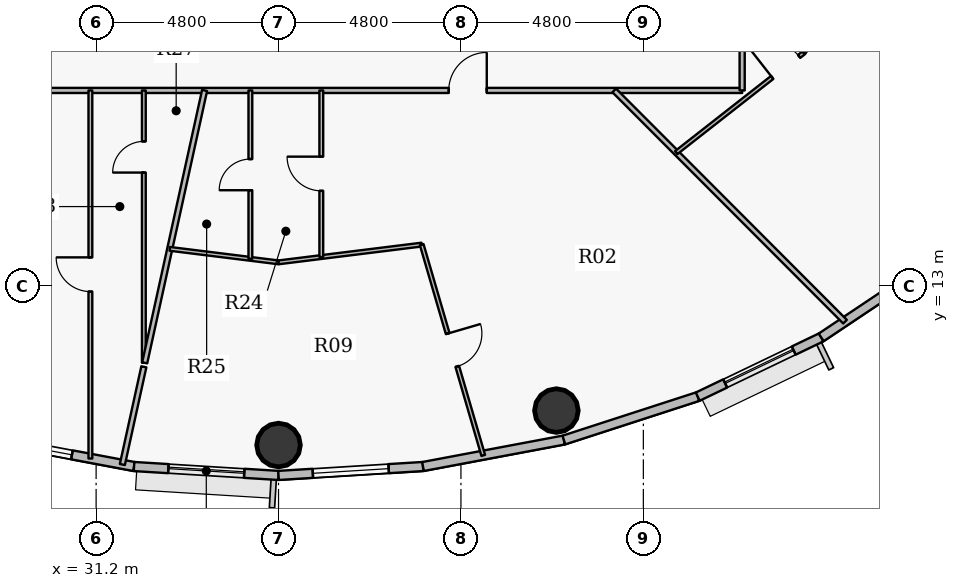
"""IFC4 building model, lengths in metres.
Left out: names, types, materials, properties, quantities, classifications, styles, units other than length and angle.
Written with IfcOpenShell. Run it as: python <this file> out.ifc"""

import sys

from ifc_helpers import new_model, si_unit, direction, frame, frame_2d, origin, origin_2d, place, context, subcontext, project, spatial, rectangle, hollow_circle, extrude, source, transform, mapped, element, fill, save


model = new_model("IFC4")
c1 = context("Model", 3, precision=1e-05, world=origin(), true_north=direction((0.0, 1.0)))
c2 = subcontext(c1, "Body", "Model", "MODEL_VIEW")
j1 = project(units=[si_unit("LENGTHUNIT", "METRE"), si_unit("PLANEANGLEUNIT", "RADIAN")], contexts=[c1])
p1 = place(None, origin())
s1 = spatial("IfcSite", under=j1, at=p1, CompositionType="ELEMENT")
p2 = place(p1, origin())
s2 = spatial("IfcBuilding", under=s1, at=p2, CompositionType="ELEMENT")
p3 = place(p2, frame((0.0, 0.0, 221.55)))
s3 = spatial("IfcBuildingStorey", under=s2, at=p3, CompositionType="ELEMENT", Elevation=221.55)
for number, where, z_axis, x_axis in (
    (1, (36.0, 8.82, 0.0), (0.0, 0.0, 1.0), (1.0, 0.0, 0.0)),
    (2, (43.312, 9.727, 0.0), (0.0, 0.0, 1.0), (1.0, 0.0, 0.0)),
):
    element("IfcColumn", number, at=place(p3, frame(where, z_axis=z_axis, x_axis=x_axis)), inside=s3, PredefinedType="COLUMN", context=c2, shape_type="SweptSolid", body=[
        extrude(hollow_circle(Radius=0.575, WallThickness=0.036, at=origin_2d()), origin(), (0.0, 0.0, 1.0), 3.75),
    ])
p4 = place(p3, frame((32.198, 8.254, 0.0), z_axis=(0.0, 0.0, 1.0), x_axis=(-0.982784898575, 0.184753465822, 0.0)))
e3 = element("IfcWall", 3, at=p4, inside=s3, PredefinedType="SOLIDWALL", context=c2, shape_type="SweptSolid", body=[
    extrude(rectangle(XDim=3.773, YDim=0.24, at=frame_2d((1.886, 0.0))), origin(), (0.0, 0.0, 1.0), 3.5),
])
p5 = place(p4, frame((1.664, 0.0, 0.9)))
e4 = element("IfcOpeningElement", 4, at=p5, cuts=e3, PredefinedType="OPENING", context=c2, shape_type="SweptSolid", body=[
    extrude(rectangle(XDim=1.25, YDim=1.65, at=origin_2d()), frame((0.625, 0.13, 0.825), z_axis=(0.0, -1.0, 0.0), x_axis=(1.0, 0.0, 0.0)), (0.0, 0.0, 1.0), 0.26),
])
p6 = place(p3, frame((36.0, 8.02, 0.0), z_axis=(0.0, 0.0, 1.0), x_axis=(-0.998108785312, 0.06147237333, 0.0)))
e5 = element("IfcWall", 5, at=p6, inside=s3, PredefinedType="SOLIDWALL", context=c2, shape_type="SweptSolid", body=[
    extrude(rectangle(XDim=3.809, YDim=0.24, at=frame_2d((1.904, 0.0))), origin(), (0.0, 0.0, 1.0), 3.5),
])
p7 = place(p6, frame((0.904, 0.0, 0.9)))
e6 = element("IfcOpeningElement", 6, at=p7, cuts=e5, PredefinedType="OPENING", context=c2, shape_type="SweptSolid", body=[
    extrude(rectangle(XDim=2.0, YDim=1.75, at=origin_2d()), frame((1.0, 0.13, 0.875), z_axis=(0.0, -1.0, 0.0), x_axis=(1.0, 0.0, 0.0)), (0.0, 0.0, 1.0), 0.26),
])
p8 = place(p3, frame((39.802, 8.254, 0.0), z_axis=(0.0, 0.0, 1.0), x_axis=(-0.998108785312, -0.06147237333, 0.0)))
e7 = element("IfcWall", 7, at=p8, inside=s3, PredefinedType="SOLIDWALL", context=c2, shape_type="SweptSolid", body=[
    extrude(rectangle(XDim=3.809, YDim=0.24, at=frame_2d((1.904, 0.0))), origin(), (0.0, 0.0, 1.0), 3.5),
])
p9 = place(p8, frame((0.905, 0.0, 0.9)))
e8 = element("IfcOpeningElement", 8, at=p9, cuts=e7, PredefinedType="OPENING", context=c2, shape_type="SweptSolid", body=[
    extrude(rectangle(XDim=2.0, YDim=1.75, at=origin_2d()), frame((1.0, 0.13, 0.875), z_axis=(0.0, -1.0, 0.0), x_axis=(1.0, 0.0, 0.0)), (0.0, 0.0, 1.0), 0.26),
])
p10 = place(p3, frame((43.509, 8.951, 0.0), z_axis=(0.0, 0.0, 1.0), x_axis=(-0.982784898575, -0.184753465822, 0.0)))
e9 = element("IfcWall", 9, at=p10, inside=s3, PredefinedType="SOLIDWALL", context=c2, shape_type="SweptSolid", body=[
    extrude(rectangle(XDim=3.773, YDim=0.24, at=frame_2d((1.886, 0.0))), origin(), (0.0, 0.0, 1.0), 3.5),
])
p11 = place(p3, frame((47.031, 10.094, 0.0), z_axis=(0.0, 0.0, 1.0), x_axis=(-0.951210789182, -0.308541787354, 0.0)))
e10 = element("IfcWall", 10, at=p11, inside=s3, PredefinedType="SOLIDWALL", context=c2, shape_type="SweptSolid", body=[
    extrude(rectangle(XDim=3.702, YDim=0.24, at=frame_2d((1.851, 0.0))), origin(), (0.0, 0.0, 1.0), 3.5),
])
p12 = place(p3, frame((50.28, 11.652, 0.0), z_axis=(0.0, 0.0, 1.0), x_axis=(-0.901598104751, -0.432574684313, 0.0)))
e11 = element("IfcWall", 11, at=p12, inside=s3, PredefinedType="SOLIDWALL", context=c2, shape_type="SweptSolid", body=[
    extrude(rectangle(XDim=3.604, YDim=0.24, at=frame_2d((1.802, 0.0))), origin(), (0.0, 0.0, 1.0), 3.5),
])
p13 = place(p12, frame((0.802, 0.0, 0.9)))
e12 = element("IfcOpeningElement", 12, at=p13, cuts=e11, PredefinedType="OPENING", context=c2, shape_type="SweptSolid", body=[
    extrude(rectangle(XDim=2.0, YDim=1.75, at=origin_2d()), frame((1.0, 0.13, 0.875), z_axis=(0.0, -1.0, 0.0), x_axis=(1.0, 0.0, 0.0)), (0.0, 0.0, 1.0), 0.26),
])
p14 = place(p3, frame((53.176, 13.589, 0.0), z_axis=(0.0, 0.0, 1.0), x_axis=(-0.831262496074, -0.555880079352, 0.0)))
e13 = element("IfcWall", 13, at=p14, inside=s3, PredefinedType="SOLIDWALL", context=c2, shape_type="SweptSolid", body=[
    extrude(rectangle(XDim=3.484, YDim=0.24, at=frame_2d((1.742, 0.0))), origin(), (0.0, 0.0, 1.0), 3.5),
])
p15 = place(p3, frame((24.35, 18.15, 0.0), z_axis=(0.0, 0.0, 1.0), x_axis=(1.0, 0.0, 0.0)))
e14 = element("IfcWall", 14, at=p15, inside=s3, PredefinedType="PARTITIONING", context=c2, shape_type="SweptSolid", body=[
    extrude(rectangle(XDim=23.85, YDim=0.135, at=frame_2d((11.925, 0.0))), origin(), (0.0, 0.0, 1.0), 2.935),
])
p16 = place(p15, frame((2.87, 0.0, 0.0)))
e15 = element("IfcOpeningElement", 15, at=p16, cuts=e14, PredefinedType="OPENING", context=c2, shape_type="SweptSolid", body=[
    extrude(rectangle(XDim=1.0, YDim=2.15, at=origin_2d()), frame((0.5, 0.078, 1.075), z_axis=(0.0, -1.0, 0.0), x_axis=(1.0, 0.0, 0.0)), (0.0, 0.0, 1.0), 0.155),
])
p17 = place(p15, frame((16.13, 0.0, 0.0)))
e16 = element("IfcOpeningElement", 16, at=p17, cuts=e14, PredefinedType="OPENING", context=c2, shape_type="SweptSolid", body=[
    extrude(rectangle(XDim=1.0, YDim=2.15, at=origin_2d()), frame((0.5, 0.078, 1.075), z_axis=(0.0, -1.0, 0.0), x_axis=(1.0, 0.0, 0.0)), (0.0, 0.0, 1.0), 0.155),
])
p18 = place(p3, frame((31.049, 8.465, 0.0), z_axis=(0.0, 0.0, 1.0), x_axis=(0.0, 1.0, 0.0)))
e17 = element("IfcWall", 17, at=p18, inside=s3, PredefinedType="PARTITIONING", context=c2, shape_type="SweptSolid", body=[
    extrude(rectangle(XDim=9.685, YDim=0.1, at=frame_2d((4.842, 0.0))), origin(), (0.0, 0.0, 1.0), 2.985),
])
p19 = place(p18, frame((4.392, 0.0, 0.0)))
e18 = element("IfcOpeningElement", 18, at=p19, cuts=e17, PredefinedType="OPENING", context=c2, shape_type="SweptSolid", body=[
    extrude(rectangle(XDim=0.9, YDim=2.1, at=origin_2d()), frame((0.45, 0.06, 1.05), z_axis=(0.0, -1.0, 0.0), x_axis=(1.0, 0.0, 0.0)), (0.0, 0.0, 1.0), 0.12),
])
p20 = place(p3, frame((31.891, 8.307, 0.0), z_axis=(0.0, 0.0, 1.0), x_axis=(0.214700779338, 0.976679873526, 0.0)))
e19 = element("IfcWall", 19, at=p20, inside=s3, PredefinedType="PARTITIONING", context=c2, shape_type="SweptSolid", body=[
    extrude(rectangle(XDim=2.632, YDim=0.135, at=frame_2d((1.316, 0.0))), origin(), (0.0, 0.0, 1.0), 2.985),
])
p21 = place(p3, frame((32.456, 10.985, 0.0), z_axis=(0.0, 0.0, 1.0), x_axis=(0.0, 1.0, 0.0)))
e20 = element("IfcWall", 20, at=p21, inside=s3, PredefinedType="PARTITIONING", context=c2, shape_type="SweptSolid", body=[
    extrude(rectangle(XDim=7.165, YDim=0.1, at=frame_2d((3.582, 0.0))), origin(), (0.0, 0.0, 1.0), 3.5),
])
p22 = place(p21, frame((5.004, 0.0, 0.0)))
e21 = element("IfcOpeningElement", 21, at=p22, cuts=e20, PredefinedType="OPENING", context=c2, shape_type="SweptSolid", body=[
    extrude(rectangle(XDim=0.82, YDim=2.1, at=origin_2d()), frame((0.41, 0.06, 1.05), z_axis=(0.0, -1.0, 0.0), x_axis=(1.0, 0.0, 0.0)), (0.0, 0.0, 1.0), 0.12),
])
p23 = place(p3, frame((32.479, 10.983, 0.0), z_axis=(0.0, 0.0, 1.0), x_axis=(0.214685976808, 0.976683127407, 0.0)))
e22 = element("IfcWall", 22, at=p23, inside=s3, PredefinedType="PARTITIONING", context=c2, shape_type="SweptSolid", body=[
    extrude(rectangle(XDim=7.338, YDim=0.135, at=frame_2d((3.669, 0.0))), origin(), (0.0, 0.0, 1.0), 3.5),
])
p24 = place(p3, frame((33.138, 13.981, 0.0), z_axis=(0.0, 0.0, 1.0), x_axis=(0.99239465631, -0.123096897311, 0.0)))
e23 = element("IfcWall", 23, at=p24, inside=s3, PredefinedType="PARTITIONING", context=c2, shape_type="SweptSolid", body=[
    extrude(rectangle(XDim=2.884, YDim=0.1, at=frame_2d((1.442, 0.0))), origin(), (0.0, 0.0, 1.0), 2.935),
])
p25 = place(p3, frame((35.259, 13.718, 0.0), z_axis=(0.0, 0.0, 1.0), x_axis=(0.0, 1.0, 0.0)))
e24 = element("IfcWall", 24, at=p25, inside=s3, PredefinedType="PARTITIONING", context=c2, shape_type="SweptSolid", body=[
    extrude(rectangle(XDim=4.432, YDim=0.1, at=frame_2d((2.216, 0.0))), origin(), (0.0, 0.0, 1.0), 3.5),
])
p26 = place(p25, frame((1.806, 0.0, 0.0)))
e25 = element("IfcOpeningElement", 25, at=p26, cuts=e24, PredefinedType="OPENING", context=c2, shape_type="SweptSolid", body=[
    extrude(rectangle(XDim=0.82, YDim=2.1, at=origin_2d()), frame((0.41, 0.06, 1.05), z_axis=(0.0, -1.0, 0.0), x_axis=(1.0, 0.0, 0.0)), (0.0, 0.0, 1.0), 0.12),
])
p27 = place(p3, frame((36.0, 13.626, 0.0), z_axis=(0.0, 0.0, 1.0), x_axis=(0.992397118202, 0.123077048159, 0.0)))
e26 = element("IfcWall", 26, at=p27, inside=s3, PredefinedType="PARTITIONING", context=c2, shape_type="SweptSolid", body=[
    extrude(rectangle(XDim=3.797, YDim=0.1, at=frame_2d((1.898, 0.0))), origin(), (0.0, 0.0, 1.0), 2.935),
])
p28 = place(p3, frame((37.126, 13.766, 0.0), z_axis=(0.0, 0.0, 1.0), x_axis=(0.0, 1.0, 0.0)))
e27 = element("IfcWall", 27, at=p28, inside=s3, PredefinedType="PARTITIONING", context=c2, shape_type="SweptSolid", body=[
    extrude(rectangle(XDim=4.384, YDim=0.1, at=frame_2d((2.192, 0.0))), origin(), (0.0, 0.0, 1.0), 3.085),
])
p29 = place(p28, frame((1.742, 0.0, 0.0)))
e28 = element("IfcOpeningElement", 28, at=p29, cuts=e27, PredefinedType="OPENING", context=c2, shape_type="SweptSolid", body=[
    extrude(rectangle(XDim=0.9, YDim=2.1, at=origin_2d()), frame((0.45, 0.06, 1.05), z_axis=(0.0, -1.0, 0.0), x_axis=(1.0, 0.0, 0.0)), (0.0, 0.0, 1.0), 0.12),
])
p30 = place(p3, frame((39.768, 14.094, 0.0), z_axis=(0.0, 0.0, 1.0), x_axis=(0.280219030024, -0.959936089129, 0.0)))
e29 = element("IfcWall", 29, at=p30, inside=s3, PredefinedType="PARTITIONING", context=c2, shape_type="SweptSolid", body=[
    extrude(rectangle(XDim=5.778, YDim=0.1, at=frame_2d((2.889, 0.0))), origin(), (0.0, 0.0, 1.0), 2.985),
])
p31 = place(p30, frame((2.439, 0.0, 0.0)))
e30 = element("IfcOpeningElement", 30, at=p31, cuts=e29, PredefinedType="OPENING", context=c2, shape_type="SweptSolid", body=[
    extrude(rectangle(XDim=0.9, YDim=2.1, at=origin_2d()), frame((0.45, 0.06, 1.05), z_axis=(0.0, -1.0, 0.0), x_axis=(1.0, 0.0, 0.0)), (0.0, 0.0, 1.0), 0.12),
])
p32 = place(p3, frame((44.833, 18.15, 0.0), z_axis=(0.0, 0.0, 1.0), x_axis=(0.706467502326, -0.707745482612, 0.0)))
e31 = element("IfcWall", 31, at=p32, inside=s3, PredefinedType="PARTITIONING", context=c2, shape_type="SweptSolid", body=[
    extrude(rectangle(XDim=8.597, YDim=0.135, at=frame_2d((4.298, 0.0))), origin(), (0.0, 0.0, 1.0), 2.985),
])
p33 = place(p3, frame((46.466, 16.515, 0.0), z_axis=(0.0, 0.0, 1.0), x_axis=(0.787371868093, 0.616478338092, 0.0)))
e32 = element("IfcWall", 32, at=p33, inside=s3, PredefinedType="PARTITIONING", context=c2, shape_type="SweptSolid", body=[
    extrude(rectangle(XDim=4.257, YDim=0.1, at=frame_2d((2.129, 0.0))), origin(), (0.0, 0.0, 1.0), 2.935),
])
p34 = place(p33, frame((3.206, 0.0, 0.0)))
e33 = element("IfcOpeningElement", 33, at=p34, cuts=e32, PredefinedType="OPENING", context=c2, shape_type="SweptSolid", body=[
    extrude(rectangle(XDim=0.9, YDim=2.1, at=origin_2d()), frame((0.45, 0.06, 1.05), z_axis=(0.0, -1.0, 0.0), x_axis=(1.0, 0.0, 0.0)), (0.0, 0.0, 1.0), 0.12),
])
p35 = place(p3, frame((48.2, 18.15, 0.0), z_axis=(0.0, 0.0, 1.0), x_axis=(0.0, 1.0, 0.0)))
e34 = element("IfcWall", 34, at=p35, inside=s3, PredefinedType="PARTITIONING", context=c2, shape_type="SweptSolid", body=[
    extrude(rectangle(XDim=1.9, YDim=0.135, at=frame_2d((0.95, 0.0))), origin(), (0.0, 0.0, 1.0), 3.5),
])
p36 = place(p3, frame((49.818, 19.139, 0.0), z_axis=(0.0, 0.0, 1.0), x_axis=(0.545406924684, 0.83817139447, 0.0)))
e35 = element("IfcWall", 35, at=p36, inside=s3, PredefinedType="PARTITIONING", context=c2, shape_type="SweptSolid", body=[
    extrude(rectangle(XDim=4.448, YDim=0.1, at=frame_2d((2.224, 0.0))), origin(), (0.0, 0.0, 1.0), 2.935),
])
m1 = source(origin(), c2, "Body", "SweptSolid", [
    extrude(rectangle(XDim=1.25, YDim=1.65, at=origin_2d()), frame((0.625, 0.03, 0.825), z_axis=(0.0, -1.0, 0.0), x_axis=(1.0, 0.0, 0.0)), (0.0, 0.0, 1.0), 0.06),
])
p37 = place(p5, origin())
e36 = element("IfcWindow", 36, at=p37, inside=s3, PartitioningType="SINGLE_PANEL", PredefinedType="WINDOW", context=c2, shape_type="MappedRepresentation", body=[
    mapped(m1, transform((0.0, 0.0, 0.0), x_axis=(1.0, 0.0, 0.0), y_axis=(0.0, 1.0, 0.0), z_axis=(0.0, 0.0, 1.0), scale=1.0)),
])
fill(e4, e36)
m2 = source(origin(), c2, "Body", "SweptSolid", [
    extrude(rectangle(XDim=2.0, YDim=1.75, at=origin_2d()), frame((1.0, 0.03, 0.875), z_axis=(0.0, -1.0, 0.0), x_axis=(1.0, 0.0, 0.0)), (0.0, 0.0, 1.0), 0.06),
])
p38 = place(p7, origin())
e37 = element("IfcWindow", 37, at=p38, inside=s3, PartitioningType="DOUBLE_PANEL_VERTICAL", PredefinedType="WINDOW", context=c2, shape_type="MappedRepresentation", body=[
    mapped(m2, transform((0.0, 0.0, 0.0), x_axis=(1.0, 0.0, 0.0), y_axis=(0.0, 1.0, 0.0), z_axis=(0.0, 0.0, 1.0), scale=1.0)),
])
fill(e6, e37)
p39 = place(p9, origin())
e38 = element("IfcWindow", 38, at=p39, inside=s3, PartitioningType="DOUBLE_PANEL_VERTICAL", PredefinedType="WINDOW", context=c2, shape_type="MappedRepresentation", body=[
    mapped(m2, transform((0.0, 0.0, 0.0), x_axis=(1.0, 0.0, 0.0), y_axis=(0.0, 1.0, 0.0), z_axis=(0.0, 0.0, 1.0), scale=1.0)),
])
fill(e8, e38)
p40 = place(p13, origin())
e39 = element("IfcWindow", 39, at=p40, inside=s3, PartitioningType="DOUBLE_PANEL_VERTICAL", PredefinedType="WINDOW", context=c2, shape_type="MappedRepresentation", body=[
    mapped(m2, transform((0.0, 0.0, 0.0), x_axis=(1.0, 0.0, 0.0), y_axis=(0.0, 1.0, 0.0), z_axis=(0.0, 0.0, 1.0), scale=1.0)),
])
fill(e12, e39)
m3 = source(origin(), c2, "Body", "SweptSolid", [
    extrude(rectangle(XDim=0.9, YDim=2.1, at=origin_2d()), frame((0.45, 0.025, 1.05), z_axis=(0.0, -1.0, 0.0), x_axis=(1.0, 0.0, 0.0)), (0.0, 0.0, 1.0), 0.05),
])
p41 = place(p19, origin())
e40 = element("IfcDoor", 40, at=p41, inside=s3, OperationType="SINGLE_SWING_RIGHT", PredefinedType="DOOR", context=c2, shape_type="MappedRepresentation", body=[
    mapped(m3, transform((0.0, 0.0, 0.0), x_axis=(1.0, 0.0, 0.0), y_axis=(0.0, 1.0, 0.0), z_axis=(0.0, 0.0, 1.0), scale=1.0)),
])
fill(e18, e40)
m4 = source(origin(), c2, "Body", "SweptSolid", [
    extrude(rectangle(XDim=0.82, YDim=2.1, at=origin_2d()), frame((0.41, 0.025, 1.05), z_axis=(0.0, -1.0, 0.0), x_axis=(1.0, 0.0, 0.0)), (0.0, 0.0, 1.0), 0.05),
])
p42 = place(p22, origin())
e41 = element("IfcDoor", 41, at=p42, inside=s3, OperationType="SINGLE_SWING_LEFT", PredefinedType="DOOR", context=c2, shape_type="MappedRepresentation", body=[
    mapped(m4, transform((0.0, 0.0, 0.0), x_axis=(1.0, 0.0, 0.0), y_axis=(0.0, 1.0, 0.0), z_axis=(0.0, 0.0, 1.0), scale=1.0)),
])
fill(e21, e41)
m5 = source(origin(), c2, "Body", "SweptSolid", [
    extrude(rectangle(XDim=1.0, YDim=2.15, at=origin_2d()), frame((0.5, 0.025, 1.075), z_axis=(0.0, -1.0, 0.0), x_axis=(1.0, 0.0, 0.0)), (0.0, 0.0, 1.0), 0.05),
])
p43 = place(p17, origin())
e42 = element("IfcDoor", 42, at=p43, inside=s3, OperationType="SINGLE_SWING_RIGHT", PredefinedType="DOOR", context=c2, shape_type="MappedRepresentation", body=[
    mapped(m5, transform((0.0, 0.0, 0.0), x_axis=(1.0, 0.0, 0.0), y_axis=(0.0, 1.0, 0.0), z_axis=(0.0, 0.0, 1.0), scale=1.0)),
])
fill(e16, e42)
p44 = place(p31, origin())
e43 = element("IfcDoor", 43, at=p44, inside=s3, OperationType="SINGLE_SWING_LEFT", PredefinedType="DOOR", context=c2, shape_type="MappedRepresentation", body=[
    mapped(m3, transform((0.0, 0.0, 0.0), x_axis=(1.0, 0.0, 0.0), y_axis=(0.0, 1.0, 0.0), z_axis=(0.0, 0.0, 1.0), scale=1.0)),
])
fill(e30, e43)
p45 = place(p29, origin())
e44 = element("IfcDoor", 44, at=p45, inside=s3, OperationType="SINGLE_SWING_RIGHT", PredefinedType="DOOR", context=c2, shape_type="MappedRepresentation", body=[
    mapped(m3, transform((0.0, 0.0, 0.0), x_axis=(1.0, 0.0, 0.0), y_axis=(0.0, 1.0, 0.0), z_axis=(0.0, 0.0, 1.0), scale=1.0)),
])
fill(e28, e44)
p46 = place(p26, origin())
e45 = element("IfcDoor", 45, at=p46, inside=s3, OperationType="SINGLE_SWING_LEFT", PredefinedType="DOOR", context=c2, shape_type="MappedRepresentation", body=[
    mapped(m4, transform((0.0, 0.0, 0.0), x_axis=(1.0, 0.0, 0.0), y_axis=(0.0, 1.0, 0.0), z_axis=(0.0, 0.0, 1.0), scale=1.0)),
])
fill(e25, e45)
p47 = place(p34, origin())
e46 = element("IfcDoor", 46, at=p47, inside=s3, OperationType="SINGLE_SWING_LEFT", PredefinedType="DOOR", context=c2, shape_type="MappedRepresentation", body=[
    mapped(m3, transform((0.0, 0.0, 0.0), x_axis=(1.0, 0.0, 0.0), y_axis=(0.0, 1.0, 0.0), z_axis=(0.0, 0.0, 1.0), scale=1.0)),
])
fill(e33, e46)
save(model, sys.argv[1])
